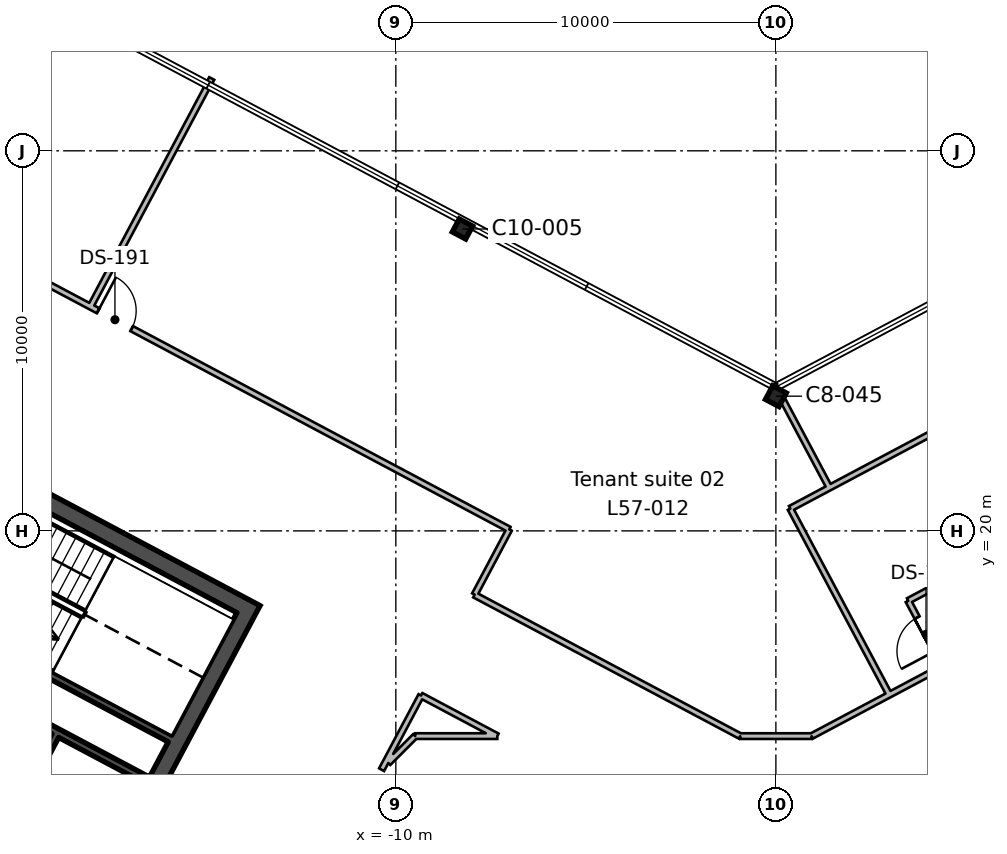
"""IFC4 building model, lengths in metres.
Left out: names, types, materials, properties, quantities, classifications, styles, units other than length and angle.
Written with IfcOpenShell. Run it as: python <this file> out.ifc"""

import sys

from ifc_helpers import new_model, si_unit, direction, frame, frame_2d, origin, origin_2d, place, context, subcontext, project, spatial, rectangle, i_section, extrude, element, fill, save


model = new_model("IFC4")
c1 = context("Model", 3, precision=1e-05, world=origin(), true_north=direction((0.0, 1.0)))
c2 = subcontext(c1, "Body", "Model", "MODEL_VIEW")
j1 = project(units=[si_unit("LENGTHUNIT", "METRE"), si_unit("PLANEANGLEUNIT", "RADIAN")], contexts=[c1])
p1 = place(None, origin())
s1 = spatial("IfcSite", under=j1, at=p1, CompositionType="ELEMENT")
p2 = place(p1, origin())
s2 = spatial("IfcBuilding", under=s1, at=p2, CompositionType="ELEMENT")
p3 = place(p2, frame((0.0, 0.0, 258.0)))
s3 = spatial("IfcBuildingStorey", under=s2, at=p3, CompositionType="ELEMENT", Elevation=258.0)
p4 = place(p3, frame((0.0, 23.544, 0.0), z_axis=(0.0, 0.0, 1.0), x_axis=(-0.882947592859, 0.469471562786, 0.0)))
e1 = element("IfcColumn", 1, at=p4, inside=s3, PredefinedType="COLUMN", context=c2, shape_type="SweptSolid", body=[
    extrude(i_section(OverallWidth=0.404, OverallDepth=0.406, WebThickness=0.027, FlangeThickness=0.044, FilletRadius=0.015, at=origin_2d()), origin(), (0.0, 0.0, 1.0), 3.9),
])
p5 = place(p3, frame((-8.247, 27.943, 0.0), z_axis=(0.0, 0.0, 1.0), x_axis=(-0.882947592859, 0.469471562786, 0.0)))
e2 = element("IfcColumn", 2, at=p5, inside=s3, PredefinedType="COLUMN", context=c2, shape_type="SweptSolid", body=[
    extrude(i_section(OverallWidth=0.399, OverallDepth=0.386, WebThickness=0.021, FlangeThickness=0.033, FilletRadius=0.015, at=origin_2d()), origin(), (0.0, 0.0, 1.0), 3.9),
])
p6 = place(p3, frame((-13.771, 18.138, 0.0), z_axis=(0.0, 0.0, 1.0), x_axis=(-0.469467968382, -0.882949504028, 0.0)))
e3 = element("IfcWall", 3, at=p6, inside=s3, PredefinedType="SHEAR", context=c2, shape_type="SweptSolid", body=[
    extrude(rectangle(XDim=19.1, YDim=0.45, at=frame_2d((9.55, 0.0))), origin(), (0.0, 0.0, 1.0), 3.9),
])
p7 = place(p6, frame((6.55, 0.0, 0.0)))
e4 = element("IfcOpeningElement", 4, at=p7, cuts=e3, PredefinedType="OPENING", context=c2, shape_type="SweptSolid", body=[
    extrude(rectangle(XDim=2.4, YDim=2.4, at=frame_2d((1.2, 1.2))), frame((0.0, 0.235, 0.0), z_axis=(0.0, -1.0, 0.0), x_axis=(1.0, 0.0, 0.0)), (0.0, 0.0, 1.0), 0.47),
])
p8 = place(p3, frame((-14.076, 18.045, 0.0), z_axis=(0.0, 0.0, 1.0), x_axis=(-0.882947755831, 0.46947125628, 0.0)))
e5 = element("IfcWall", 5, at=p8, inside=s3, PredefinedType="SHEAR", context=c2, shape_type="SweptSolid", body=[
    extrude(rectangle(XDim=20.2, YDim=0.45, at=frame_2d((10.1, 0.0))), origin(), (0.0, 0.0, 1.0), 3.9),
])
p9 = place(p3, frame((-18.96, 14.611, 0.0), z_axis=(0.0, 0.0, 1.0), x_axis=(-0.4694473164, -0.882960484464, 0.0)))
e6 = element("IfcWall", 6, at=p9, inside=s3, PredefinedType="SHEAR", context=c2, shape_type="SweptSolid", body=[
    extrude(rectangle(XDim=2.2, YDim=0.2, at=frame_2d((1.1, 0.0))), origin(), (0.0, 0.0, 1.0), 3.9),
])
p10 = place(p3, frame((-15.942, 14.536, 0.0), z_axis=(0.0, 0.0, 1.0), x_axis=(-0.882946947542, 0.469472776449, 0.0)))
e7 = element("IfcWall", 7, at=p10, inside=s3, PredefinedType="SHEAR", context=c2, shape_type="SweptSolid", body=[
    extrude(rectangle(XDim=8.0, YDim=0.2, at=frame_2d((4.0, 0.0))), origin(), (0.0, 0.0, 1.0), 3.9),
])
p11 = place(p3, frame((-16.529, 13.432, 0.0), z_axis=(0.0, 0.0, 1.0), x_axis=(-0.88295287151, 0.469461634952, 0.0)))
e8 = element("IfcWall", 8, at=p11, inside=s3, PredefinedType="SHEAR", context=c2, shape_type="SweptSolid", body=[
    extrude(rectangle(XDim=8.0, YDim=0.2, at=frame_2d((4.0, 0.0))), origin(), (0.0, 0.0, 1.0), 3.9),
])
p12 = place(p3, frame((-32.975, 33.842, 0.0), z_axis=(0.0, 0.0, 1.0), x_axis=(0.882957739094, -0.469452479995, 0.0)))
e9 = element("IfcWall", 9, at=p12, inside=s3, PredefinedType="PARTITIONING", context=c2, shape_type="SweptSolid", body=[
    extrude(rectangle(XDim=21.016, YDim=0.15, at=frame_2d((10.508, 0.0))), origin(), (0.0, 0.0, 1.0), 3.54),
])
p13 = place(p12, frame((17.15, 0.0, 0.0)))
e10 = element("IfcOpeningElement", 10, at=p13, cuts=e9, PredefinedType="OPENING", context=c2, shape_type="SweptSolid", body=[
    extrude(rectangle(XDim=1.0, YDim=2.1, at=frame_2d((0.5, 1.05))), frame((0.0, 0.085, 0.0), z_axis=(0.0, -1.0, 0.0), x_axis=(1.0, 0.0, 0.0)), (0.0, 0.0, 1.0), 0.17),
])
p14 = place(p12, frame((10.05, 0.0, 0.0)))
e11 = element("IfcOpeningElement", 11, at=p14, cuts=e9, PredefinedType="OPENING", context=c2, shape_type="SweptSolid", body=[
    extrude(rectangle(XDim=1.0, YDim=2.1, at=frame_2d((0.5, 1.05))), frame((0.0, 0.085, 0.0), z_axis=(0.0, -1.0, 0.0), x_axis=(1.0, 0.0, 0.0)), (0.0, 0.0, 1.0), 0.17),
])
p15 = place(p3, frame((-14.844, 31.903, 0.0), z_axis=(0.0, 0.0, 1.0), x_axis=(-0.469294360179, -0.88304179035, 0.0)))
e12 = element("IfcWall", 12, at=p15, inside=s3, PredefinedType="PARTITIONING", context=c2, shape_type="SweptSolid", body=[
    extrude(rectangle(XDim=6.799, YDim=0.15, at=frame_2d((3.4, 0.0))), origin(), (0.0, 0.0, 1.0), 3.54),
])
p16 = place(p3, frame((-7.927, 18.321, 0.0), z_axis=(0.0, 0.0, 1.0), x_axis=(0.46931118996, 0.883032845923, 0.0)))
e13 = element("IfcWall", 13, at=p16, inside=s3, PredefinedType="PARTITIONING", context=c2, shape_type="SweptSolid", body=[
    extrude(rectangle(XDim=1.946, YDim=0.15, at=frame_2d((0.973, 0.0))), origin(), (0.0, 0.0, 1.0), 3.54),
])
p17 = place(p3, frame((-14.419, 23.976, 0.0), z_axis=(0.0, 0.0, 1.0), x_axis=(0.88291475538, -0.469533315891, 0.0)))
e14 = element("IfcWall", 14, at=p17, inside=s3, PredefinedType="PARTITIONING", context=c2, shape_type="SweptSolid", body=[
    extrude(rectangle(XDim=8.387, YDim=0.15, at=frame_2d((4.193, 0.0))), origin(), (0.0, 0.0, 1.0), 3.54),
])
p18 = place(p3, frame((-7.929, 18.316, 0.0), z_axis=(0.0, 0.0, 1.0), x_axis=(0.882990705926, -0.469390469917, 0.0)))
e15 = element("IfcWall", 15, at=p18, inside=s3, PredefinedType="PARTITIONING", context=c2, shape_type="SweptSolid", body=[
    extrude(rectangle(XDim=7.916, YDim=0.15, at=frame_2d((3.958, 0.0))), origin(), (0.0, 0.0, 1.0), 3.54),
])
p19 = place(p3, frame((-0.939, 14.6, 0.0), z_axis=(0.0, 0.0, 1.0), x_axis=(1.0, 0.0, 0.0)))
e16 = element("IfcWall", 16, at=p19, inside=s3, PredefinedType="PARTITIONING", context=c2, shape_type="SweptSolid", body=[
    extrude(rectangle(XDim=1.878, YDim=0.15, at=frame_2d((0.939, 0.0))), origin(), (0.0, 0.0, 1.0), 3.54),
])
p20 = place(p3, frame((0.939, 14.6, 0.0), z_axis=(0.0, 0.0, 1.0), x_axis=(0.882925173343, 0.469513725333, 0.0)))
e17 = element("IfcWall", 17, at=p20, inside=s3, PredefinedType="PARTITIONING", context=c2, shape_type="SweptSolid", body=[
    extrude(rectangle(XDim=3.917, YDim=0.15, at=frame_2d((1.958, 0.0))), origin(), (0.0, 0.0, 1.0), 3.54),
])
p21 = place(p3, frame((4.397, 16.439, 0.0), z_axis=(0.0, 0.0, 1.0), x_axis=(-0.469469630874, 0.882948620072, 0.0)))
e18 = element("IfcWall", 18, at=p21, inside=s3, PredefinedType="PARTITIONING", context=c2, shape_type="SweptSolid", body=[
    extrude(rectangle(XDim=1.949, YDim=0.15, at=frame_2d((0.975, 0.0))), origin(), (0.0, 0.0, 1.0), 3.54),
])
p22 = place(p21, frame((0.45, 0.0, 0.0)))
e19 = element("IfcOpeningElement", 19, at=p22, cuts=e18, PredefinedType="OPENING", context=c2, shape_type="SweptSolid", body=[
    extrude(rectangle(XDim=1.0, YDim=2.1, at=frame_2d((0.5, 1.05))), frame((0.0, 0.085, 0.0), z_axis=(0.0, -1.0, 0.0), x_axis=(1.0, 0.0, 0.0)), (0.0, 0.0, 1.0), 0.17),
])
p23 = place(p3, frame((0.379, 20.587, 0.0), z_axis=(0.0, 0.0, 1.0), x_axis=(0.4695947342, -0.882882090435, 0.0)))
e20 = element("IfcWall", 20, at=p23, inside=s3, PredefinedType="PARTITIONING", context=c2, shape_type="SweptSolid", body=[
    extrude(rectangle(XDim=5.55, YDim=0.15, at=frame_2d((2.775, 0.0))), origin(), (0.0, 0.0, 1.0), 3.54),
])
p24 = place(p3, frame((0.178, 23.45, 0.0), z_axis=(0.0, 0.0, 1.0), x_axis=(0.469495603372, -0.882934809833, 0.0)))
e21 = element("IfcWall", 21, at=p24, inside=s3, PredefinedType="PARTITIONING", context=c2, shape_type="SweptSolid", body=[
    extrude(rectangle(XDim=2.622, YDim=0.15, at=frame_2d((1.311, 0.0))), origin(), (0.0, 0.0, 1.0), 3.54),
])
p25 = place(p3, frame((1.406, 21.134, 0.0), z_axis=(0.0, 0.0, 1.0), x_axis=(-0.882590930183, -0.470141733905, 0.0)))
e22 = element("IfcWall", 22, at=p25, inside=s3, PredefinedType="PARTITIONING", context=c2, shape_type="SweptSolid", body=[
    extrude(rectangle(XDim=1.164, YDim=0.15, at=frame_2d((0.582, 0.0))), origin(), (0.0, 0.0, 1.0), 3.54),
])
p26 = place(p3, frame((1.406, 21.134, 0.0), z_axis=(0.0, 0.0, 1.0), x_axis=(0.882947357853, 0.469472004768, 0.0)))
e23 = element("IfcWall", 23, at=p26, inside=s3, PredefinedType="PARTITIONING", context=c2, shape_type="SweptSolid", body=[
    extrude(rectangle(XDim=28.379, YDim=0.15, at=frame_2d((14.189, 0.0))), origin(), (0.0, 0.0, 1.0), 3.54),
])
p27 = place(p3, frame((3.482, 18.16, 0.0), z_axis=(0.0, 0.0, 1.0), x_axis=(0.882943240209, 0.469479748838, 0.0)))
e24 = element("IfcWall", 24, at=p27, inside=s3, PredefinedType="PARTITIONING", context=c2, shape_type="SweptSolid", body=[
    extrude(rectangle(XDim=28.6, YDim=0.15, at=frame_2d((14.3, 0.0))), origin(), (0.0, 0.0, 1.0), 3.54),
])
p28 = place(p3, frame((-9.491, 14.6, 0.0), z_axis=(0.0, 0.0, 1.0), x_axis=(1.0, 0.0, 0.0)))
e25 = element("IfcWall", 25, at=p28, inside=s3, PredefinedType="PARTITIONING", context=c2, shape_type="SweptSolid", body=[
    extrude(rectangle(XDim=2.161, YDim=0.15, at=frame_2d((1.081, 0.0))), origin(), (0.0, 0.0, 1.0), 3.54),
])
p29 = place(p3, frame((-7.33, 14.6, 0.0), z_axis=(0.0, 0.0, 1.0), x_axis=(-0.882798481657, 0.469751892794, 0.0)))
e26 = element("IfcWall", 26, at=p29, inside=s3, PredefinedType="PARTITIONING", context=c2, shape_type="SweptSolid", body=[
    extrude(rectangle(XDim=2.273, YDim=0.15, at=frame_2d((1.137, 0.0))), origin(), (0.0, 0.0, 1.0), 3.54),
])
p30 = place(p3, frame((-9.337, 15.668, 0.0), z_axis=(0.0, 0.0, 1.0), x_axis=(-0.469556197415, -0.882902586625, 0.0)))
e27 = element("IfcWall", 27, at=p30, inside=s3, PredefinedType="PARTITIONING", context=c2, shape_type="SweptSolid", body=[
    extrude(rectangle(XDim=2.211, YDim=0.15, at=frame_2d((1.105, 0.0))), origin(), (0.0, 0.0, 1.0), 3.54),
])
p31 = place(p3, frame((-10.198, 13.893, 0.0), z_axis=(0.0, 0.0, 1.0), x_axis=(0.707106781187, 0.707106781187, 0.0)))
e28 = element("IfcWall", 28, at=p31, inside=s3, PredefinedType="PARTITIONING", context=c2, shape_type="SweptSolid", body=[
    extrude(rectangle(XDim=1.0, YDim=0.15, at=frame_2d((0.5, 0.0))), origin(), (0.0, 0.0, 1.0), 3.54),
])
p32 = place(p22, origin())
e29 = element("IfcDoor", 29, at=p32, inside=s3, OperationType="SINGLE_SWING_LEFT", PredefinedType="DOOR", context=c2, shape_type="SweptSolid", body=[
    extrude(rectangle(XDim=1.0, YDim=2.1, at=frame_2d((0.5, 1.05))), frame((0.0, 0.025, 0.0), z_axis=(0.0, -1.0, 0.0), x_axis=(1.0, 0.0, 0.0)), (0.0, 0.0, 1.0), 0.05),
])
fill(e19, e29)
p33 = place(p13, origin())
e30 = element("IfcDoor", 30, at=p33, inside=s3, OperationType="SINGLE_SWING_LEFT", PredefinedType="DOOR", context=c2, shape_type="SweptSolid", body=[
    extrude(rectangle(XDim=1.0, YDim=2.1, at=frame_2d((0.5, 1.05))), frame((0.0, 0.025, 0.0), z_axis=(0.0, -1.0, 0.0), x_axis=(1.0, 0.0, 0.0)), (0.0, 0.0, 1.0), 0.05),
])
fill(e10, e30)
save(model, sys.argv[1])
